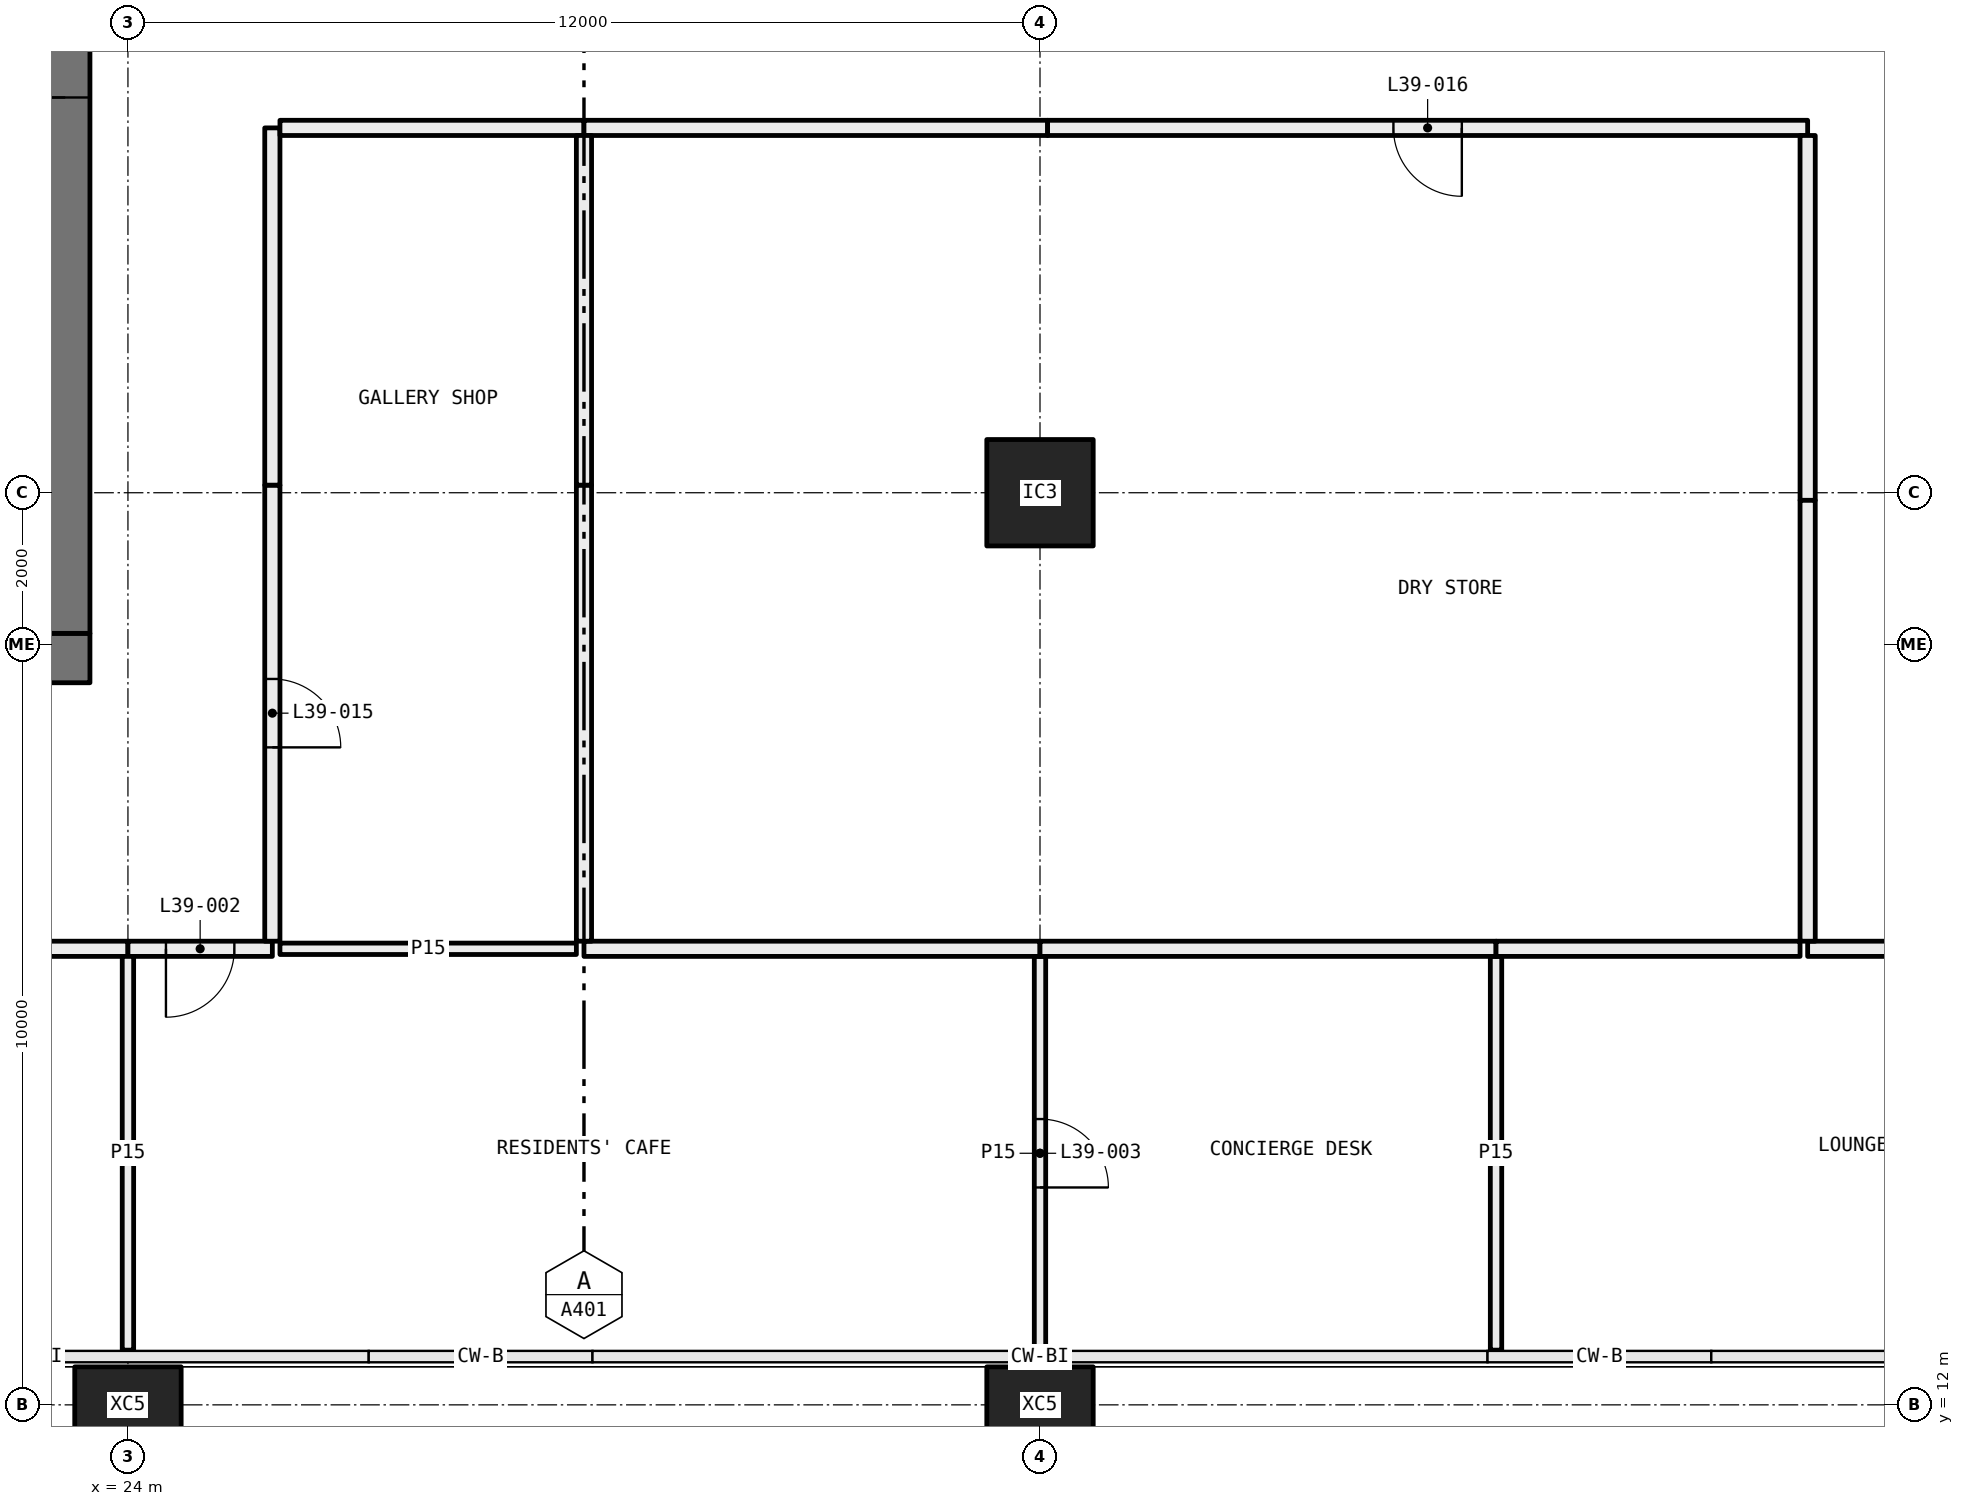
"""IFC4 building model, lengths in metres.
Left out: names, types, materials, properties, quantities, classifications, styles, units other than length and angle.
Written with IfcOpenShell. Run it as: python <this file> out.ifc"""

import sys

from ifc_helpers import new_model, si_unit, direction, frame, frame_2d, origin, origin_2d, place, context, subcontext, project, spatial, rectangle, hollow_rectangle, extrude, element, fill, save


model = new_model("IFC4")
c1 = context("Model", 3, precision=1e-05, world=origin(), true_north=direction((0.0, 1.0)))
c2 = subcontext(c1, "Body", "Model", "MODEL_VIEW")
j1 = project(units=[si_unit("LENGTHUNIT", "METRE"), si_unit("PLANEANGLEUNIT", "RADIAN")], contexts=[c1])
p1 = place(None, origin())
s1 = spatial("IfcSite", under=j1, at=p1, CompositionType="ELEMENT")
p2 = place(p1, origin())
s2 = spatial("IfcBuilding", under=s1, at=p2, CompositionType="ELEMENT")
p3 = place(p2, frame((0.0, 0.0, 148.35)))
s3 = spatial("IfcBuildingStorey", under=s2, at=p3, CompositionType="ELEMENT", Elevation=148.35)
for number, where, z_axis, x_axis in (
    (1, (24.0, 12.0, -0.4), (0.0, 0.0, 1.0), (1.0, 0.0, 0.0)),
    (2, (36.0, 12.0, -0.4), (0.0, 0.0, 1.0), (1.0, 0.0, 0.0)),
):
    element("IfcColumn", number, at=place(p3, frame(where, z_axis=z_axis, x_axis=x_axis)), inside=s3, PredefinedType="COLUMN", context=c2, shape_type="SweptSolid", body=[
        extrude(hollow_rectangle(XDim=1.4, YDim=1.0, WallThickness=0.055, at=origin_2d()), origin(), (0.0, 0.0, 1.0), 5.4),
    ])
p4 = place(p3, frame((36.0, 24.0, 0.0), z_axis=(0.0, 0.0, 1.0), x_axis=(1.0, 0.0, 0.0)))
e3 = element("IfcColumn", 3, at=p4, inside=s3, PredefinedType="COLUMN", context=c2, shape_type="SweptSolid", body=[
    extrude(hollow_rectangle(XDim=1.4, YDim=1.4, WallThickness=0.06, at=origin_2d()), origin(), (0.0, 0.0, 1.0), 5.0),
])
p5 = place(p3, frame((10.1, 18.0, 0.0), z_axis=(0.0, 0.0, 1.0), x_axis=(1.0, 0.0, 0.0)))
e4 = element("IfcWall", 4, at=p5, inside=s3, PredefinedType="PARTITIONING", context=c2, shape_type="SweptSolid", body=[
    extrude(rectangle(XDim=13.9, YDim=0.2, at=frame_2d((6.95, 0.0))), origin(), (0.0, 0.0, 1.0), 5.0),
])
p6 = place(p5, frame((6.15, 0.0, 0.0)))
e5 = element("IfcOpeningElement", 5, at=p6, cuts=e4, PredefinedType="OPENING", context=c2, shape_type="SweptSolid", body=[
    extrude(rectangle(XDim=1.6, YDim=2.1, at=frame_2d((0.8, 1.05))), frame((0.0, 0.11, 0.0), z_axis=(0.0, -1.0, 0.0), x_axis=(1.0, 0.0, 0.0)), (0.0, 0.0, 1.0), 0.22),
])
p7 = place(p3, frame((24.0, 18.0, 0.0), z_axis=(0.0, 0.0, 1.0), x_axis=(1.0, 0.0, 0.0)))
e6 = element("IfcWall", 6, at=p7, inside=s3, PredefinedType="PARTITIONING", context=c2, shape_type="SweptSolid", body=[
    extrude(rectangle(XDim=1.9, YDim=0.2, at=frame_2d((0.95, 0.0))), origin(), (0.0, 0.0, 1.0), 5.0),
])
p8 = place(p7, frame((0.5, 0.0, 0.0)))
e7 = element("IfcOpeningElement", 7, at=p8, cuts=e6, PredefinedType="OPENING", context=c2, shape_type="SweptSolid", body=[
    extrude(rectangle(XDim=0.9, YDim=2.1, at=frame_2d((0.45, 1.05))), frame((0.0, 0.11, 0.0), z_axis=(0.0, -1.0, 0.0), x_axis=(1.0, 0.0, 0.0)), (0.0, 0.0, 1.0), 0.22),
])
p9 = place(p3, frame((46.1, 18.0, 0.0), z_axis=(0.0, 0.0, 1.0), x_axis=(1.0, 0.0, 0.0)))
e8 = element("IfcWall", 8, at=p9, inside=s3, PredefinedType="PARTITIONING", context=c2, shape_type="SweptSolid", body=[
    extrude(rectangle(XDim=7.9, YDim=0.2, at=frame_2d((3.95, 0.0))), origin(), (0.0, 0.0, 1.0), 5.0),
])
p10 = place(p9, frame((3.15, 0.0, 0.0)))
e9 = element("IfcOpeningElement", 9, at=p10, cuts=e8, PredefinedType="OPENING", context=c2, shape_type="SweptSolid", body=[
    extrude(rectangle(XDim=1.6, YDim=2.1, at=frame_2d((0.8, 1.05))), frame((0.0, 0.11, 0.0), z_axis=(0.0, -1.0, 0.0), x_axis=(1.0, 0.0, 0.0)), (0.0, 0.0, 1.0), 0.22),
])
p11 = place(p3, frame((25.9, 18.1, 0.0), z_axis=(0.0, 0.0, 1.0), x_axis=(0.0, 1.0, 0.0)))
e10 = element("IfcWall", 10, at=p11, inside=s3, PredefinedType="PARTITIONING", context=c2, shape_type="SweptSolid", body=[
    extrude(rectangle(XDim=6.0, YDim=0.2, at=frame_2d((3.0, 0.0))), origin(), (0.0, 0.0, 1.0), 4.4),
])
p12 = place(p11, frame((2.55, 0.0, 0.0)))
e11 = element("IfcOpeningElement", 11, at=p12, cuts=e10, PredefinedType="OPENING", context=c2, shape_type="SweptSolid", body=[
    extrude(rectangle(XDim=0.9, YDim=2.1, at=frame_2d((0.45, 1.05))), frame((0.0, 0.11, 0.0), z_axis=(0.0, -1.0, 0.0), x_axis=(1.0, 0.0, 0.0)), (0.0, 0.0, 1.0), 0.22),
])
p13 = place(p3, frame((25.9, 24.1, 0.0), z_axis=(0.0, 0.0, 1.0), x_axis=(0.0, 1.0, 0.0)))
e12 = element("IfcWall", 12, at=p13, inside=s3, PredefinedType="PARTITIONING", context=c2, shape_type="SweptSolid", body=[
    extrude(rectangle(XDim=4.7, YDim=0.2, at=frame_2d((2.35, 0.0))), origin(), (0.0, 0.0, 1.0), 5.0),
])
p14 = place(p3, frame((26.0, 28.8, 0.0), z_axis=(0.0, 0.0, 1.0), x_axis=(1.0, 0.0, 0.0)))
e13 = element("IfcWall", 13, at=p14, inside=s3, PredefinedType="PARTITIONING", context=c2, shape_type="SweptSolid", body=[
    extrude(rectangle(XDim=4.0, YDim=0.2, at=frame_2d((2.0, 0.0))), origin(), (0.0, 0.0, 1.0), 5.0),
])
p15 = place(p3, frame((30.0, 28.8, 0.0), z_axis=(0.0, 0.0, 1.0), x_axis=(1.0, 0.0, 0.0)))
e14 = element("IfcWall", 14, at=p15, inside=s3, PredefinedType="PARTITIONING", context=c2, shape_type="SweptSolid", body=[
    extrude(rectangle(XDim=6.1, YDim=0.2, at=frame_2d((3.05, 0.0))), origin(), (0.0, 0.0, 1.0), 4.4),
])
p16 = place(p3, frame((36.1, 28.8, 0.0), z_axis=(0.0, 0.0, 1.0), x_axis=(1.0, 0.0, 0.0)))
e15 = element("IfcWall", 15, at=p16, inside=s3, PredefinedType="PARTITIONING", context=c2, shape_type="SweptSolid", body=[
    extrude(rectangle(XDim=10.0, YDim=0.2, at=frame_2d((5.0, 0.0))), origin(), (0.0, 0.0, 1.0), 5.0),
])
p17 = place(p16, frame((4.55, 0.0, 0.0)))
e16 = element("IfcOpeningElement", 16, at=p17, cuts=e15, PredefinedType="OPENING", context=c2, shape_type="SweptSolid", body=[
    extrude(rectangle(XDim=0.9, YDim=2.1, at=frame_2d((0.45, 1.05))), frame((0.0, 0.11, 0.0), z_axis=(0.0, -1.0, 0.0), x_axis=(1.0, 0.0, 0.0)), (0.0, 0.0, 1.0), 0.22),
])
p18 = place(p3, frame((46.1, 28.7, 0.0), z_axis=(0.0, 0.0, 1.0), x_axis=(0.0, -1.0, 0.0)))
e17 = element("IfcWall", 17, at=p18, inside=s3, PredefinedType="PARTITIONING", context=c2, shape_type="SweptSolid", body=[
    extrude(rectangle(XDim=4.8, YDim=0.2, at=frame_2d((2.4, 0.0))), origin(), (0.0, 0.0, 1.0), 4.4),
])
p19 = place(p3, frame((46.1, 23.9, 0.0), z_axis=(0.0, 0.0, 1.0), x_axis=(0.0, -1.0, 0.0)))
e18 = element("IfcWall", 18, at=p19, inside=s3, PredefinedType="PARTITIONING", context=c2, shape_type="SweptSolid", body=[
    extrude(rectangle(XDim=5.8, YDim=0.2, at=frame_2d((2.9, 0.0))), origin(), (0.0, 0.0, 1.0), 5.0),
])
p20 = place(p3, frame((24.0, 12.72, 0.0), z_axis=(0.0, 0.0, 1.0), x_axis=(0.0, 1.0, 0.0)))
e19 = element("IfcWall", 19, at=p20, inside=s3, PredefinedType="PARTITIONING", context=c2, shape_type="SweptSolid", body=[
    extrude(rectangle(XDim=5.18, YDim=0.15, at=frame_2d((2.59, 0.0))), origin(), (0.0, 0.0, 1.0), 5.0),
])
p21 = place(p3, frame((36.0, 12.72, 0.0), z_axis=(0.0, 0.0, 1.0), x_axis=(0.0, 1.0, 0.0)))
e20 = element("IfcWall", 20, at=p21, inside=s3, PredefinedType="PARTITIONING", context=c2, shape_type="SweptSolid", body=[
    extrude(rectangle(XDim=5.18, YDim=0.15, at=frame_2d((2.59, 0.0))), origin(), (0.0, 0.0, 1.0), 4.4),
])
p22 = place(p21, frame((2.14, 0.0, 0.0)))
e21 = element("IfcOpeningElement", 21, at=p22, cuts=e20, PredefinedType="OPENING", context=c2, shape_type="SweptSolid", body=[
    extrude(rectangle(XDim=0.9, YDim=2.1, at=frame_2d((0.45, 1.05))), frame((0.0, 0.085, 0.0), z_axis=(0.0, -1.0, 0.0), x_axis=(1.0, 0.0, 0.0)), (0.0, 0.0, 1.0), 0.17),
])
p23 = place(p3, frame((29.9, 18.0, 0.0), z_axis=(0.0, 0.0, 1.0), x_axis=(-1.0, 0.0, 0.0)))
e22 = element("IfcWall", 22, at=p23, inside=s3, PredefinedType="PARTITIONING", context=c2, shape_type="SweptSolid", body=[
    extrude(rectangle(XDim=3.9, YDim=0.15, at=frame_2d((1.95, 0.0))), origin(), (0.0, 0.0, 1.0), 5.0),
])
p24 = place(p3, frame((36.0, 18.0, 0.0), z_axis=(0.0, 0.0, 1.0), x_axis=(-1.0, 0.0, 0.0)))
e23 = element("IfcWall", 23, at=p24, inside=s3, PredefinedType="PARTITIONING", context=c2, shape_type="SweptSolid", body=[
    extrude(rectangle(XDim=6.0, YDim=0.2, at=frame_2d((3.0, 0.0))), origin(), (0.0, 0.0, 1.0), 4.4),
])
p25 = place(p3, frame((42.0, 12.72, 0.0), z_axis=(0.0, 0.0, 1.0), x_axis=(0.0, 1.0, 0.0)))
e24 = element("IfcWall", 24, at=p25, inside=s3, PredefinedType="PARTITIONING", context=c2, shape_type="SweptSolid", body=[
    extrude(rectangle(XDim=5.18, YDim=0.15, at=frame_2d((2.59, 0.0))), origin(), (0.0, 0.0, 1.0), 5.0),
])
p26 = place(p3, frame((42.0, 18.0, 0.0), z_axis=(0.0, 0.0, 1.0), x_axis=(-1.0, 0.0, 0.0)))
e25 = element("IfcWall", 25, at=p26, inside=s3, PredefinedType="PARTITIONING", context=c2, shape_type="SweptSolid", body=[
    extrude(rectangle(XDim=6.0, YDim=0.2, at=frame_2d((3.0, 0.0))), origin(), (0.0, 0.0, 1.0), 4.4),
])
p27 = place(p3, frame((46.0, 18.0, 0.0), z_axis=(0.0, 0.0, 1.0), x_axis=(-1.0, 0.0, 0.0)))
e26 = element("IfcWall", 26, at=p27, inside=s3, PredefinedType="PARTITIONING", context=c2, shape_type="SweptSolid", body=[
    extrude(rectangle(XDim=4.0, YDim=0.2, at=frame_2d((2.0, 0.0))), origin(), (0.0, 0.0, 1.0), 5.0),
])
p28 = place(p3, frame((30.0, 18.1, 0.0), z_axis=(0.0, 0.0, 1.0), x_axis=(0.0, 1.0, 0.0)))
e27 = element("IfcWall", 27, at=p28, inside=s3, PredefinedType="PARTITIONING", context=c2, shape_type="SweptSolid", body=[
    extrude(rectangle(XDim=6.0, YDim=0.2, at=frame_2d((3.0, 0.0))), origin(), (0.0, 0.0, 1.0), 4.4),
])
p29 = place(p3, frame((30.0, 24.1, 0.0), z_axis=(0.0, 0.0, 1.0), x_axis=(0.0, 1.0, 0.0)))
e28 = element("IfcWall", 28, at=p29, inside=s3, PredefinedType="PARTITIONING", context=c2, shape_type="SweptSolid", body=[
    extrude(rectangle(XDim=4.6, YDim=0.2, at=frame_2d((2.3, 0.0))), origin(), (0.0, 0.0, 1.0), 5.0),
])
p30 = place(p3, frame((12.5, 21.825, 0.0), z_axis=(0.0, 0.0, 1.0), x_axis=(1.0, 0.0, 0.0)))
e29 = element("IfcWall", 29, at=p30, inside=s3, PredefinedType="SHEAR", context=c2, shape_type="SweptSolid", body=[
    extrude(rectangle(XDim=11.0, YDim=0.65, at=frame_2d((5.5, 0.0))), origin(), (0.0, 0.0, 1.0), 5.0),
])
p31 = place(p3, frame((23.175, 22.15, 0.0), z_axis=(0.0, 0.0, 1.0), x_axis=(0.0, 1.0, 0.0)))
e30 = element("IfcWall", 30, at=p31, inside=s3, PredefinedType="SHEAR", context=c2, shape_type="SweptSolid", body=[
    extrude(rectangle(XDim=15.7, YDim=0.65, at=frame_2d((7.85, 0.0))), origin(), (0.0, 0.0, 1.0), 5.0),
])
p32 = place(p31, frame((7.05, 0.0, 0.0)))
e31 = element("IfcOpeningElement", 31, at=p32, cuts=e30, PredefinedType="OPENING", context=c2, shape_type="SweptSolid", body=[
    extrude(rectangle(XDim=1.6, YDim=2.1, at=frame_2d((0.8, 1.05))), frame((0.0, 0.335, 0.0), z_axis=(0.0, -1.0, 0.0), x_axis=(1.0, 0.0, 0.0)), (0.0, 0.0, 1.0), 0.67),
])
p33 = place(p8, frame((0.9, 0.0, 0.0), x_axis=(-1.0, 0.0, 0.0)))
e32 = element("IfcDoor", 32, at=p33, inside=s3, OperationType="SINGLE_SWING_LEFT", PredefinedType="DOOR", context=c2, shape_type="SweptSolid", body=[
    extrude(rectangle(XDim=0.9, YDim=2.1, at=frame_2d((0.45, 1.05))), frame((0.0, 0.025, 0.0), z_axis=(0.0, -1.0, 0.0), x_axis=(1.0, 0.0, 0.0)), (0.0, 0.0, 1.0), 0.05),
])
fill(e7, e32)
p34 = place(p22, frame((0.9, 0.0, 0.0), x_axis=(-1.0, 0.0, 0.0)))
e33 = element("IfcDoor", 33, at=p34, inside=s3, OperationType="SINGLE_SWING_LEFT", PredefinedType="DOOR", context=c2, shape_type="SweptSolid", body=[
    extrude(rectangle(XDim=0.9, YDim=2.1, at=frame_2d((0.45, 1.05))), frame((0.0, 0.025, 0.0), z_axis=(0.0, -1.0, 0.0), x_axis=(1.0, 0.0, 0.0)), (0.0, 0.0, 1.0), 0.05),
])
fill(e21, e33)
p35 = place(p12, frame((0.9, 0.0, 0.0), x_axis=(-1.0, 0.0, 0.0)))
e34 = element("IfcDoor", 34, at=p35, inside=s3, OperationType="SINGLE_SWING_LEFT", PredefinedType="DOOR", context=c2, shape_type="SweptSolid", body=[
    extrude(rectangle(XDim=0.9, YDim=2.1, at=frame_2d((0.45, 1.05))), frame((0.0, 0.025, 0.0), z_axis=(0.0, -1.0, 0.0), x_axis=(1.0, 0.0, 0.0)), (0.0, 0.0, 1.0), 0.05),
])
fill(e11, e34)
p36 = place(p17, frame((0.9, 0.0, 0.0), x_axis=(-1.0, 0.0, 0.0)))
e35 = element("IfcDoor", 35, at=p36, inside=s3, OperationType="SINGLE_SWING_RIGHT", PredefinedType="DOOR", context=c2, shape_type="SweptSolid", body=[
    extrude(rectangle(XDim=0.9, YDim=2.1, at=frame_2d((0.45, 1.05))), frame((0.0, 0.025, 0.0), z_axis=(0.0, -1.0, 0.0), x_axis=(1.0, 0.0, 0.0)), (0.0, 0.0, 1.0), 0.05),
])
fill(e16, e35)
p37 = place(p32, origin())
e36 = element("IfcDoor", 36, at=p37, inside=s3, OperationType="DOUBLE_DOOR_SINGLE_SWING", PredefinedType="DOOR", context=c2, shape_type="SweptSolid", body=[
    extrude(rectangle(XDim=1.6, YDim=2.1, at=frame_2d((0.8, 1.05))), frame((0.0, 0.025, 0.0), z_axis=(0.0, -1.0, 0.0), x_axis=(1.0, 0.0, 0.0)), (0.0, 0.0, 1.0), 0.05),
])
fill(e31, e36)
save(model, sys.argv[1])
